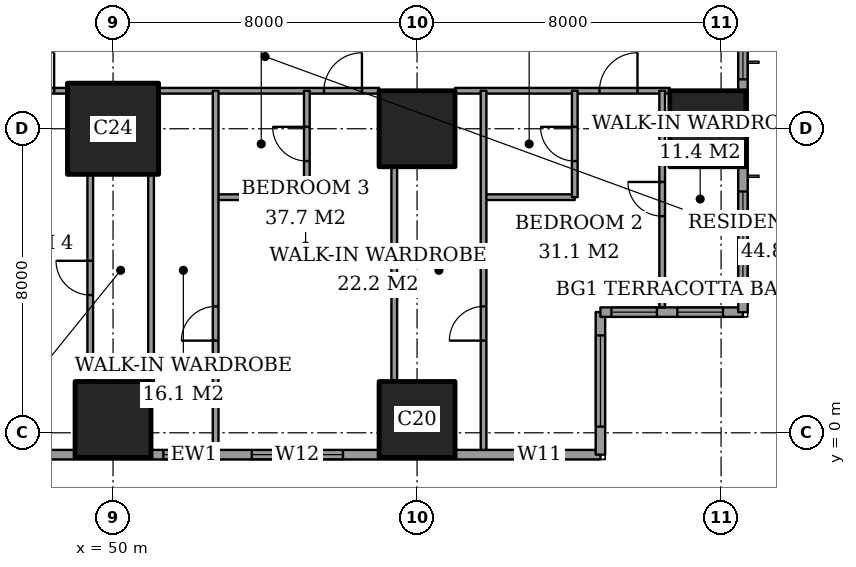
"""IFC4 building model, lengths in metres.
Left out: names, types, materials, properties, quantities, classifications, styles, units other than length and angle.
Written with IfcOpenShell. Run it as: python <this file> out.ifc"""

import sys

from ifc_helpers import new_model, si_unit, direction, frame, frame_2d, origin, origin_2d, place, context, subcontext, project, spatial, rectangle, extrude, element, fill, save


model = new_model("IFC4")
c1 = context("Model", 3, precision=1e-05, world=origin(), true_north=direction((0.0, 1.0)))
c2 = subcontext(c1, "Body", "Model", "MODEL_VIEW")
j1 = project(units=[si_unit("LENGTHUNIT", "METRE"), si_unit("PLANEANGLEUNIT", "RADIAN")], contexts=[c1])
p1 = place(None, origin())
s1 = spatial("IfcSite", under=j1, at=p1, CompositionType="ELEMENT")
p2 = place(p1, origin())
s2 = spatial("IfcBuilding", under=s1, at=p2, CompositionType="ELEMENT")
p3 = place(p2, frame((0.0, 0.0, 128.6)))
s3 = spatial("IfcBuildingStorey", under=s2, at=p3, CompositionType="ELEMENT", Elevation=128.6)
p4 = place(p3, frame((50.0, 0.35, 0.0), z_axis=(0.0, 0.0, 1.0), x_axis=(1.0, 0.0, 0.0)))
e1 = element("IfcColumn", 1, at=p4, inside=s3, PredefinedType="COLUMN", context=c2, shape_type="SweptSolid", body=[
    extrude(rectangle(XDim=2.0, YDim=2.0, at=origin_2d()), origin(), (0.0, 0.0, 1.0), 3.6),
])
p5 = place(p3, frame((50.0, 8.0, 0.0), z_axis=(0.0, 0.0, 1.0), x_axis=(1.0, 0.0, 0.0)))
e2 = element("IfcColumn", 2, at=p5, inside=s3, PredefinedType="COLUMN", context=c2, shape_type="SweptSolid", body=[
    extrude(rectangle(XDim=2.4, YDim=2.4, at=origin_2d()), origin(), (0.0, 0.0, 1.0), 3.6),
])
for number, where, z_axis, x_axis in (
    (3, (58.0, 0.35, 0.0), (0.0, 0.0, 1.0), (1.0, 0.0, 0.0)),
    (4, (58.0, 8.0, 0.0), (0.0, 0.0, 1.0), (1.0, 0.0, 0.0)),
    (5, (65.65, 8.0, 0.0), (0.0, 0.0, 1.0), (1.0, 0.0, 0.0)),
):
    element("IfcColumn", number, at=place(p3, frame(where, z_axis=z_axis, x_axis=x_axis)), inside=s3, PredefinedType="COLUMN", context=c2, shape_type="SweptSolid", body=[
        extrude(rectangle(XDim=2.0, YDim=2.0, at=origin_2d()), origin(), (0.0, 0.0, 1.0), 3.6),
    ])
p6 = place(p3, frame((41.425, -0.575, 0.0), z_axis=(0.0, 0.0, 1.0), x_axis=(1.0, 0.0, 0.0)))
e6 = element("IfcWall", 6, at=p6, inside=s3, PredefinedType="SOLIDWALL", context=c2, shape_type="SweptSolid", body=[
    extrude(rectangle(XDim=21.4, YDim=0.25, at=frame_2d((10.7, 0.0))), origin(), (0.0, 0.0, 1.0), 3.6),
])
p7 = place(p6, frame((2.3, 0.0, 0.4)))
e7 = element("IfcOpeningElement", 7, at=p7, cuts=e6, PredefinedType="OPENING", context=c2, shape_type="SweptSolid", body=[
    extrude(rectangle(XDim=1.2, YDim=2.2, at=frame_2d((0.6, 1.1))), frame((0.0, 0.135, 0.0), z_axis=(0.0, -1.0, 0.0), x_axis=(1.0, 0.0, 0.0)), (0.0, 0.0, 1.0), 0.27),
])
p8 = place(p6, frame((4.525, 0.0, 0.4)))
e8 = element("IfcOpeningElement", 8, at=p8, cuts=e6, PredefinedType="OPENING", context=c2, shape_type="SweptSolid", body=[
    extrude(rectangle(XDim=2.4, YDim=2.2, at=frame_2d((1.2, 1.1))), frame((0.0, 0.135, 0.0), z_axis=(0.0, -1.0, 0.0), x_axis=(1.0, 0.0, 0.0)), (0.0, 0.0, 1.0), 0.27),
])
p9 = place(p6, frame((9.9, 0.0, 0.4)))
e9 = element("IfcOpeningElement", 9, at=p9, cuts=e6, PredefinedType="OPENING", context=c2, shape_type="SweptSolid", body=[
    extrude(rectangle(XDim=1.2, YDim=2.2, at=frame_2d((0.6, 1.1))), frame((0.0, 0.135, 0.0), z_axis=(0.0, -1.0, 0.0), x_axis=(1.0, 0.0, 0.0)), (0.0, 0.0, 1.0), 0.27),
])
p10 = place(p6, frame((12.225, 0.0, 0.4)))
e10 = element("IfcOpeningElement", 10, at=p10, cuts=e6, PredefinedType="OPENING", context=c2, shape_type="SweptSolid", body=[
    extrude(rectangle(XDim=2.4, YDim=2.2, at=frame_2d((1.2, 1.1))), frame((0.0, 0.135, 0.0), z_axis=(0.0, -1.0, 0.0), x_axis=(1.0, 0.0, 0.0)), (0.0, 0.0, 1.0), 0.27),
])
p11 = place(p6, frame((19.2, 0.0, 0.4)))
e11 = element("IfcOpeningElement", 11, at=p11, cuts=e6, PredefinedType="OPENING", context=c2, shape_type="SweptSolid", body=[
    extrude(rectangle(XDim=1.2, YDim=2.2, at=frame_2d((0.6, 1.1))), frame((0.0, 0.135, 0.0), z_axis=(0.0, -1.0, 0.0), x_axis=(1.0, 0.0, 0.0)), (0.0, 0.0, 1.0), 0.27),
])
p12 = place(p3, frame((62.825, -0.575, 0.0), z_axis=(0.0, 0.0, 1.0), x_axis=(0.0, 1.0, 0.0)))
e12 = element("IfcWall", 12, at=p12, inside=s3, PredefinedType="SOLIDWALL", context=c2, shape_type="SweptSolid", body=[
    extrude(rectangle(XDim=3.75, YDim=0.25, at=frame_2d((1.875, 0.0))), origin(), (0.0, 0.0, 1.0), 3.6),
])
p13 = place(p12, frame((0.738, 0.0, 0.4)))
e13 = element("IfcOpeningElement", 13, at=p13, cuts=e12, PredefinedType="OPENING", context=c2, shape_type="SweptSolid", body=[
    extrude(rectangle(XDim=2.4, YDim=2.2, at=frame_2d((1.2, 1.1))), frame((0.0, 0.135, 0.0), z_axis=(0.0, -1.0, 0.0), x_axis=(1.0, 0.0, 0.0)), (0.0, 0.0, 1.0), 0.27),
])
p14 = place(p3, frame((62.825, 3.175, 0.0), z_axis=(0.0, 0.0, 1.0), x_axis=(1.0, 0.0, 0.0)))
e14 = element("IfcWall", 14, at=p14, inside=s3, PredefinedType="SOLIDWALL", context=c2, shape_type="SweptSolid", body=[
    extrude(rectangle(XDim=3.75, YDim=0.25, at=frame_2d((1.875, 0.0))), origin(), (0.0, 0.0, 1.0), 3.6),
])
p15 = place(p14, frame((0.288, 0.0, 0.4)))
e15 = element("IfcOpeningElement", 15, at=p15, cuts=e14, PredefinedType="OPENING", context=c2, shape_type="SweptSolid", body=[
    extrude(rectangle(XDim=1.2, YDim=2.2, at=frame_2d((0.6, 1.1))), frame((0.0, 0.135, 0.0), z_axis=(0.0, -1.0, 0.0), x_axis=(1.0, 0.0, 0.0)), (0.0, 0.0, 1.0), 0.27),
])
p16 = place(p14, frame((2.025, 0.0, 0.4)))
e16 = element("IfcOpeningElement", 16, at=p16, cuts=e14, PredefinedType="OPENING", context=c2, shape_type="SweptSolid", body=[
    extrude(rectangle(XDim=1.2, YDim=2.2, at=frame_2d((0.6, 1.1))), frame((0.0, 0.135, 0.0), z_axis=(0.0, -1.0, 0.0), x_axis=(1.0, 0.0, 0.0)), (0.0, 0.0, 1.0), 0.27),
])
p17 = place(p3, frame((66.575, 3.175, 0.0), z_axis=(0.0, 0.0, 1.0), x_axis=(0.0, 1.0, 0.0)))
e17 = element("IfcWall", 17, at=p17, inside=s3, PredefinedType="SOLIDWALL", context=c2, shape_type="SweptSolid", body=[
    extrude(rectangle(XDim=41.65, YDim=0.25, at=frame_2d((20.825, 0.0))), origin(), (0.0, 0.0, 1.0), 3.6),
])
p18 = place(p17, frame((0.775, 0.0, 0.4)))
e18 = element("IfcOpeningElement", 18, at=p18, cuts=e17, PredefinedType="OPENING", context=c2, shape_type="SweptSolid", body=[
    extrude(rectangle(XDim=2.4, YDim=2.2, at=frame_2d((1.2, 1.1))), frame((0.0, 0.135, 0.0), z_axis=(0.0, -1.0, 0.0), x_axis=(1.0, 0.0, 0.0)), (0.0, 0.0, 1.0), 0.27),
])
p19 = place(p17, frame((6.125, 0.0, 0.4)))
e19 = element("IfcOpeningElement", 19, at=p19, cuts=e17, PredefinedType="OPENING", context=c2, shape_type="SweptSolid", body=[
    extrude(rectangle(XDim=1.2, YDim=2.2, at=frame_2d((0.6, 1.1))), frame((0.0, 0.135, 0.0), z_axis=(0.0, -1.0, 0.0), x_axis=(1.0, 0.0, 0.0)), (0.0, 0.0, 1.0), 0.27),
])
p20 = place(p17, frame((8.375, 0.0, 0.4)))
e20 = element("IfcOpeningElement", 20, at=p20, cuts=e17, PredefinedType="OPENING", context=c2, shape_type="SweptSolid", body=[
    extrude(rectangle(XDim=2.4, YDim=2.2, at=frame_2d((1.2, 1.1))), frame((0.0, 0.135, 0.0), z_axis=(0.0, -1.0, 0.0), x_axis=(1.0, 0.0, 0.0)), (0.0, 0.0, 1.0), 0.27),
])
p21 = place(p17, frame((15.775, 0.0, 0.4)))
e21 = element("IfcOpeningElement", 21, at=p21, cuts=e17, PredefinedType="OPENING", context=c2, shape_type="SweptSolid", body=[
    extrude(rectangle(XDim=2.4, YDim=2.2, at=frame_2d((1.2, 1.1))), frame((0.0, 0.135, 0.0), z_axis=(0.0, -1.0, 0.0), x_axis=(1.0, 0.0, 0.0)), (0.0, 0.0, 1.0), 0.27),
])
p22 = place(p17, frame((23.475, 0.0, 0.4)))
e22 = element("IfcOpeningElement", 22, at=p22, cuts=e17, PredefinedType="OPENING", context=c2, shape_type="SweptSolid", body=[
    extrude(rectangle(XDim=2.4, YDim=2.2, at=frame_2d((1.2, 1.1))), frame((0.0, 0.135, 0.0), z_axis=(0.0, -1.0, 0.0), x_axis=(1.0, 0.0, 0.0)), (0.0, 0.0, 1.0), 0.27),
])
p23 = place(p17, frame((30.975, 0.0, 0.4)))
e23 = element("IfcOpeningElement", 23, at=p23, cuts=e17, PredefinedType="OPENING", context=c2, shape_type="SweptSolid", body=[
    extrude(rectangle(XDim=2.4, YDim=2.2, at=frame_2d((1.2, 1.1))), frame((0.0, 0.135, 0.0), z_axis=(0.0, -1.0, 0.0), x_axis=(1.0, 0.0, 0.0)), (0.0, 0.0, 1.0), 0.27),
])
p24 = place(p17, frame((34.5, 0.0, 0.4)))
e24 = element("IfcOpeningElement", 24, at=p24, cuts=e17, PredefinedType="OPENING", context=c2, shape_type="SweptSolid", body=[
    extrude(rectangle(XDim=1.2, YDim=2.2, at=frame_2d((0.6, 1.1))), frame((0.0, 0.135, 0.0), z_axis=(0.0, -1.0, 0.0), x_axis=(1.0, 0.0, 0.0)), (0.0, 0.0, 1.0), 0.27),
])
p25 = place(p17, frame((38.475, 0.0, 0.4)))
e25 = element("IfcOpeningElement", 25, at=p25, cuts=e17, PredefinedType="OPENING", context=c2, shape_type="SweptSolid", body=[
    extrude(rectangle(XDim=2.4, YDim=2.2, at=frame_2d((1.2, 1.1))), frame((0.0, 0.135, 0.0), z_axis=(0.0, -1.0, 0.0), x_axis=(1.0, 0.0, 0.0)), (0.0, 0.0, 1.0), 0.27),
])
p26 = place(p3, frame((52.7, 6.2, 0.0), z_axis=(0.0, 0.0, 1.0), x_axis=(1.0, 0.0, 0.0)))
e26 = element("IfcWall", 26, at=p26, inside=s3, PredefinedType="PARTITIONING", context=c2, shape_type="SweptSolid", body=[
    extrude(rectangle(XDim=2.4, YDim=0.15, at=frame_2d((1.2, 0.0))), origin(), (0.0, 0.0, 1.0), 3.35),
])
p27 = place(p3, frame((59.75, 6.2, 0.0), z_axis=(0.0, 0.0, 1.0), x_axis=(1.0, 0.0, 0.0)))
e27 = element("IfcWall", 27, at=p27, inside=s3, PredefinedType="PARTITIONING", context=c2, shape_type="SweptSolid", body=[
    extrude(rectangle(XDim=2.4, YDim=0.15, at=frame_2d((1.2, 0.0))), origin(), (0.0, 0.0, 1.0), 3.35),
])
p28 = place(p3, frame((43.35, 9.0, 0.0), z_axis=(0.0, 0.0, 1.0), x_axis=(1.0, 0.0, 0.0)))
e28 = element("IfcWall", 28, at=p28, inside=s3, PredefinedType="PARTITIONING", context=c2, shape_type="SweptSolid", body=[
    extrude(rectangle(XDim=5.45, YDim=0.15, at=frame_2d((2.725, 0.0))), origin(), (0.0, 0.0, 1.0), 3.35),
])
p29 = place(p28, frame((4.1, 0.0, 0.0)))
e29 = element("IfcOpeningElement", 29, at=p29, cuts=e28, PredefinedType="OPENING", context=c2, shape_type="SweptSolid", body=[
    extrude(rectangle(XDim=1.0, YDim=2.1, at=frame_2d((0.5, 1.05))), frame((0.0, 0.085, 0.0), z_axis=(0.0, -1.0, 0.0), x_axis=(1.0, 0.0, 0.0)), (0.0, 0.0, 1.0), 0.17),
])
p30 = place(p28, frame((0.475, 0.0, 0.0)))
e30 = element("IfcOpeningElement", 30, at=p30, cuts=e28, PredefinedType="OPENING", context=c2, shape_type="SweptSolid", body=[
    extrude(rectangle(XDim=1.0, YDim=2.1, at=frame_2d((0.5, 1.05))), frame((0.0, 0.085, 0.0), z_axis=(0.0, -1.0, 0.0), x_axis=(1.0, 0.0, 0.0)), (0.0, 0.0, 1.0), 0.17),
])
p31 = place(p3, frame((51.2, 9.0, 0.0), z_axis=(0.0, 0.0, 1.0), x_axis=(1.0, 0.0, 0.0)))
e31 = element("IfcWall", 31, at=p31, inside=s3, PredefinedType="PARTITIONING", context=c2, shape_type="SweptSolid", body=[
    extrude(rectangle(XDim=5.8, YDim=0.15, at=frame_2d((2.9, 0.0))), origin(), (0.0, 0.0, 1.0), 3.35),
])
p32 = place(p31, frame((4.35, 0.0, 0.0)))
e32 = element("IfcOpeningElement", 32, at=p32, cuts=e31, PredefinedType="OPENING", context=c2, shape_type="SweptSolid", body=[
    extrude(rectangle(XDim=1.0, YDim=2.1, at=frame_2d((0.5, 1.05))), frame((0.0, 0.085, 0.0), z_axis=(0.0, -1.0, 0.0), x_axis=(1.0, 0.0, 0.0)), (0.0, 0.0, 1.0), 0.17),
])
p33 = place(p3, frame((59.0, 9.0, 0.0), z_axis=(0.0, 0.0, 1.0), x_axis=(1.0, 0.0, 0.0)))
e33 = element("IfcWall", 33, at=p33, inside=s3, PredefinedType="PARTITIONING", context=c2, shape_type="SweptSolid", body=[
    extrude(rectangle(XDim=5.65, YDim=0.15, at=frame_2d((2.825, 0.0))), origin(), (0.0, 0.0, 1.0), 3.35),
])
p34 = place(p33, frame((3.8, 0.0, 0.0)))
e34 = element("IfcOpeningElement", 34, at=p34, cuts=e33, PredefinedType="OPENING", context=c2, shape_type="SweptSolid", body=[
    extrude(rectangle(XDim=1.0, YDim=2.1, at=frame_2d((0.5, 1.05))), frame((0.0, 0.085, 0.0), z_axis=(0.0, -1.0, 0.0), x_axis=(1.0, 0.0, 0.0)), (0.0, 0.0, 1.0), 0.17),
])
p35 = place(p3, frame((49.4, 1.35, 0.0), z_axis=(0.0, 0.0, 1.0), x_axis=(0.0, 1.0, 0.0)))
e35 = element("IfcWall", 35, at=p35, inside=s3, PredefinedType="PARTITIONING", context=c2, shape_type="SweptSolid", body=[
    extrude(rectangle(XDim=5.45, YDim=0.15, at=frame_2d((2.725, 0.0))), origin(), (0.0, 0.0, 1.0), 3.35),
])
p36 = place(p35, frame((2.275, 0.0, 0.0)))
e36 = element("IfcOpeningElement", 36, at=p36, cuts=e35, PredefinedType="OPENING", context=c2, shape_type="SweptSolid", body=[
    extrude(rectangle(XDim=0.9, YDim=2.1, at=frame_2d((0.45, 1.05))), frame((0.0, 0.085, 0.0), z_axis=(0.0, -1.0, 0.0), x_axis=(1.0, 0.0, 0.0)), (0.0, 0.0, 1.0), 0.17),
])
p37 = place(p3, frame((51.0, 1.35, 0.0), z_axis=(0.0, 0.0, 1.0), x_axis=(0.0, 1.0, 0.0)))
e37 = element("IfcWall", 37, at=p37, inside=s3, PredefinedType="PARTITIONING", context=c2, shape_type="SweptSolid", body=[
    extrude(rectangle(XDim=5.45, YDim=0.15, at=frame_2d((2.725, 0.0))), origin(), (0.0, 0.0, 1.0), 3.35),
])
p38 = place(p3, frame((52.7, -0.45, 0.0), z_axis=(0.0, 0.0, 1.0), x_axis=(0.0, 1.0, 0.0)))
e38 = element("IfcWall", 38, at=p38, inside=s3, PredefinedType="PARTITIONING", context=c2, shape_type="SweptSolid", body=[
    extrude(rectangle(XDim=9.45, YDim=0.15, at=frame_2d((4.725, 0.0))), origin(), (0.0, 0.0, 1.0), 3.35),
])
p39 = place(p38, frame((2.875, 0.0, 0.0)))
e39 = element("IfcOpeningElement", 39, at=p39, cuts=e38, PredefinedType="OPENING", context=c2, shape_type="SweptSolid", body=[
    extrude(rectangle(XDim=0.9, YDim=2.1, at=frame_2d((0.45, 1.05))), frame((0.0, 0.085, 0.0), z_axis=(0.0, -1.0, 0.0), x_axis=(1.0, 0.0, 0.0)), (0.0, 0.0, 1.0), 0.17),
])
p40 = place(p3, frame((55.1, 6.2, 0.0), z_axis=(0.0, 0.0, 1.0), x_axis=(0.0, 1.0, 0.0)))
e40 = element("IfcWall", 40, at=p40, inside=s3, PredefinedType="PARTITIONING", context=c2, shape_type="SweptSolid", body=[
    extrude(rectangle(XDim=2.8, YDim=0.15, at=frame_2d((1.4, 0.0))), origin(), (0.0, 0.0, 1.0), 3.35),
])
p41 = place(p40, frame((0.95, 0.0, 0.0)))
e41 = element("IfcOpeningElement", 41, at=p41, cuts=e40, PredefinedType="OPENING", context=c2, shape_type="SweptSolid", body=[
    extrude(rectangle(XDim=0.9, YDim=2.1, at=frame_2d((0.45, 1.05))), frame((0.0, 0.085, 0.0), z_axis=(0.0, -1.0, 0.0), x_axis=(1.0, 0.0, 0.0)), (0.0, 0.0, 1.0), 0.17),
])
p42 = place(p3, frame((57.4, 1.35, 0.0), z_axis=(0.0, 0.0, 1.0), x_axis=(0.0, 1.0, 0.0)))
e42 = element("IfcWall", 42, at=p42, inside=s3, PredefinedType="PARTITIONING", context=c2, shape_type="SweptSolid", body=[
    extrude(rectangle(XDim=5.65, YDim=0.15, at=frame_2d((2.825, 0.0))), origin(), (0.0, 0.0, 1.0), 3.35),
])
p43 = place(p3, frame((59.75, -0.45, 0.0), z_axis=(0.0, 0.0, 1.0), x_axis=(0.0, 1.0, 0.0)))
e43 = element("IfcWall", 43, at=p43, inside=s3, PredefinedType="PARTITIONING", context=c2, shape_type="SweptSolid", body=[
    extrude(rectangle(XDim=9.45, YDim=0.15, at=frame_2d((4.725, 0.0))), origin(), (0.0, 0.0, 1.0), 3.35),
])
p44 = place(p43, frame((2.875, 0.0, 0.0)))
e44 = element("IfcOpeningElement", 44, at=p44, cuts=e43, PredefinedType="OPENING", context=c2, shape_type="SweptSolid", body=[
    extrude(rectangle(XDim=0.9, YDim=2.1, at=frame_2d((0.45, 1.05))), frame((0.0, 0.085, 0.0), z_axis=(0.0, -1.0, 0.0), x_axis=(1.0, 0.0, 0.0)), (0.0, 0.0, 1.0), 0.17),
])
p45 = place(p3, frame((62.15, 6.2, 0.0), z_axis=(0.0, 0.0, 1.0), x_axis=(0.0, 1.0, 0.0)))
e45 = element("IfcWall", 45, at=p45, inside=s3, PredefinedType="PARTITIONING", context=c2, shape_type="SweptSolid", body=[
    extrude(rectangle(XDim=2.8, YDim=0.15, at=frame_2d((1.4, 0.0))), origin(), (0.0, 0.0, 1.0), 3.35),
])
p46 = place(p45, frame((0.95, 0.0, 0.0)))
e46 = element("IfcOpeningElement", 46, at=p46, cuts=e45, PredefinedType="OPENING", context=c2, shape_type="SweptSolid", body=[
    extrude(rectangle(XDim=0.9, YDim=2.1, at=frame_2d((0.45, 1.05))), frame((0.0, 0.085, 0.0), z_axis=(0.0, -1.0, 0.0), x_axis=(1.0, 0.0, 0.0)), (0.0, 0.0, 1.0), 0.17),
])
p47 = place(p3, frame((64.45, 3.3, 0.0), z_axis=(0.0, 0.0, 1.0), x_axis=(0.0, 1.0, 0.0)))
e47 = element("IfcWall", 47, at=p47, inside=s3, PredefinedType="PARTITIONING", context=c2, shape_type="SweptSolid", body=[
    extrude(rectangle(XDim=5.7, YDim=0.15, at=frame_2d((2.85, 0.0))), origin(), (0.0, 0.0, 1.0), 3.35),
])
p48 = place(p47, frame((2.4, 0.0, 0.0)))
e48 = element("IfcOpeningElement", 48, at=p48, cuts=e47, PredefinedType="OPENING", context=c2, shape_type="SweptSolid", body=[
    extrude(rectangle(XDim=0.9, YDim=2.1, at=frame_2d((0.45, 1.05))), frame((0.0, 0.085, 0.0), z_axis=(0.0, -1.0, 0.0), x_axis=(1.0, 0.0, 0.0)), (0.0, 0.0, 1.0), 0.17),
])
p49 = place(p9, origin())
e49 = element("IfcWindow", 49, at=p49, inside=s3, PartitioningType="SINGLE_PANEL", PredefinedType="WINDOW", context=c2, shape_type="SweptSolid", body=[
    extrude(rectangle(XDim=1.2, YDim=2.2, at=frame_2d((0.6, 1.1))), frame((0.0, 0.03, 0.0), z_axis=(0.0, -1.0, 0.0), x_axis=(1.0, 0.0, 0.0)), (0.0, 0.0, 1.0), 0.06),
])
fill(e9, e49)
p50 = place(p10, origin())
e50 = element("IfcWindow", 50, at=p50, inside=s3, PartitioningType="SINGLE_PANEL", PredefinedType="WINDOW", context=c2, shape_type="SweptSolid", body=[
    extrude(rectangle(XDim=2.4, YDim=2.2, at=frame_2d((1.2, 1.1))), frame((0.0, 0.03, 0.0), z_axis=(0.0, -1.0, 0.0), x_axis=(1.0, 0.0, 0.0)), (0.0, 0.0, 1.0), 0.06),
])
fill(e10, e50)
p51 = place(p11, origin())
e51 = element("IfcWindow", 51, at=p51, inside=s3, PartitioningType="SINGLE_PANEL", PredefinedType="WINDOW", context=c2, shape_type="SweptSolid", body=[
    extrude(rectangle(XDim=1.2, YDim=2.2, at=frame_2d((0.6, 1.1))), frame((0.0, 0.03, 0.0), z_axis=(0.0, -1.0, 0.0), x_axis=(1.0, 0.0, 0.0)), (0.0, 0.0, 1.0), 0.06),
])
fill(e11, e51)
p52 = place(p13, origin())
e52 = element("IfcWindow", 52, at=p52, inside=s3, PartitioningType="SINGLE_PANEL", PredefinedType="WINDOW", context=c2, shape_type="SweptSolid", body=[
    extrude(rectangle(XDim=2.4, YDim=2.2, at=frame_2d((1.2, 1.1))), frame((0.0, 0.03, 0.0), z_axis=(0.0, -1.0, 0.0), x_axis=(1.0, 0.0, 0.0)), (0.0, 0.0, 1.0), 0.06),
])
fill(e13, e52)
p53 = place(p15, origin())
e53 = element("IfcWindow", 53, at=p53, inside=s3, PartitioningType="SINGLE_PANEL", PredefinedType="WINDOW", context=c2, shape_type="SweptSolid", body=[
    extrude(rectangle(XDim=1.2, YDim=2.2, at=frame_2d((0.6, 1.1))), frame((0.0, 0.03, 0.0), z_axis=(0.0, -1.0, 0.0), x_axis=(1.0, 0.0, 0.0)), (0.0, 0.0, 1.0), 0.06),
])
fill(e15, e53)
p54 = place(p16, origin())
e54 = element("IfcWindow", 54, at=p54, inside=s3, PartitioningType="SINGLE_PANEL", PredefinedType="WINDOW", context=c2, shape_type="SweptSolid", body=[
    extrude(rectangle(XDim=1.2, YDim=2.2, at=frame_2d((0.6, 1.1))), frame((0.0, 0.03, 0.0), z_axis=(0.0, -1.0, 0.0), x_axis=(1.0, 0.0, 0.0)), (0.0, 0.0, 1.0), 0.06),
])
fill(e16, e54)
p55 = place(p18, origin())
e55 = element("IfcWindow", 55, at=p55, inside=s3, PartitioningType="SINGLE_PANEL", PredefinedType="WINDOW", context=c2, shape_type="SweptSolid", body=[
    extrude(rectangle(XDim=2.4, YDim=2.2, at=frame_2d((1.2, 1.1))), frame((0.0, 0.03, 0.0), z_axis=(0.0, -1.0, 0.0), x_axis=(1.0, 0.0, 0.0)), (0.0, 0.0, 1.0), 0.06),
])
fill(e18, e55)
p56 = place(p19, origin())
e56 = element("IfcWindow", 56, at=p56, inside=s3, PartitioningType="SINGLE_PANEL", PredefinedType="WINDOW", context=c2, shape_type="SweptSolid", body=[
    extrude(rectangle(XDim=1.2, YDim=2.2, at=frame_2d((0.6, 1.1))), frame((0.0, 0.03, 0.0), z_axis=(0.0, -1.0, 0.0), x_axis=(1.0, 0.0, 0.0)), (0.0, 0.0, 1.0), 0.06),
])
fill(e19, e56)
p57 = place(p48, origin())
e57 = element("IfcDoor", 57, at=p57, inside=s3, OperationType="SINGLE_SWING_LEFT", PredefinedType="DOOR", context=c2, shape_type="SweptSolid", body=[
    extrude(rectangle(XDim=0.9, YDim=2.1, at=frame_2d((0.45, 1.05))), frame((0.0, 0.025, 0.0), z_axis=(0.0, -1.0, 0.0), x_axis=(1.0, 0.0, 0.0)), (0.0, 0.0, 1.0), 0.05),
])
fill(e48, e57)
p58 = place(p46, origin())
e58 = element("IfcDoor", 58, at=p58, inside=s3, OperationType="SINGLE_SWING_LEFT", PredefinedType="DOOR", context=c2, shape_type="SweptSolid", body=[
    extrude(rectangle(XDim=0.9, YDim=2.1, at=frame_2d((0.45, 1.05))), frame((0.0, 0.025, 0.0), z_axis=(0.0, -1.0, 0.0), x_axis=(1.0, 0.0, 0.0)), (0.0, 0.0, 1.0), 0.05),
])
fill(e46, e58)
p59 = place(p34, origin())
e59 = element("IfcDoor", 59, at=p59, inside=s3, OperationType="SINGLE_SWING_LEFT", PredefinedType="DOOR", context=c2, shape_type="SweptSolid", body=[
    extrude(rectangle(XDim=1.0, YDim=2.1, at=frame_2d((0.5, 1.05))), frame((0.0, 0.025, 0.0), z_axis=(0.0, -1.0, 0.0), x_axis=(1.0, 0.0, 0.0)), (0.0, 0.0, 1.0), 0.05),
])
fill(e34, e59)
p60 = place(p44, origin())
e60 = element("IfcDoor", 60, at=p60, inside=s3, OperationType="SINGLE_SWING_RIGHT", PredefinedType="DOOR", context=c2, shape_type="SweptSolid", body=[
    extrude(rectangle(XDim=0.9, YDim=2.1, at=frame_2d((0.45, 1.05))), frame((0.0, 0.025, 0.0), z_axis=(0.0, -1.0, 0.0), x_axis=(1.0, 0.0, 0.0)), (0.0, 0.0, 1.0), 0.05),
])
fill(e44, e60)
p61 = place(p41, origin())
e61 = element("IfcDoor", 61, at=p61, inside=s3, OperationType="SINGLE_SWING_LEFT", PredefinedType="DOOR", context=c2, shape_type="SweptSolid", body=[
    extrude(rectangle(XDim=0.9, YDim=2.1, at=frame_2d((0.45, 1.05))), frame((0.0, 0.025, 0.0), z_axis=(0.0, -1.0, 0.0), x_axis=(1.0, 0.0, 0.0)), (0.0, 0.0, 1.0), 0.05),
])
fill(e41, e61)
p62 = place(p32, origin())
e62 = element("IfcDoor", 62, at=p62, inside=s3, OperationType="SINGLE_SWING_LEFT", PredefinedType="DOOR", context=c2, shape_type="SweptSolid", body=[
    extrude(rectangle(XDim=1.0, YDim=2.1, at=frame_2d((0.5, 1.05))), frame((0.0, 0.025, 0.0), z_axis=(0.0, -1.0, 0.0), x_axis=(1.0, 0.0, 0.0)), (0.0, 0.0, 1.0), 0.05),
])
fill(e32, e62)
p63 = place(p39, origin())
e63 = element("IfcDoor", 63, at=p63, inside=s3, OperationType="SINGLE_SWING_RIGHT", PredefinedType="DOOR", context=c2, shape_type="SweptSolid", body=[
    extrude(rectangle(XDim=0.9, YDim=2.1, at=frame_2d((0.45, 1.05))), frame((0.0, 0.025, 0.0), z_axis=(0.0, -1.0, 0.0), x_axis=(1.0, 0.0, 0.0)), (0.0, 0.0, 1.0), 0.05),
])
fill(e39, e63)
p64 = place(p36, origin())
e64 = element("IfcDoor", 64, at=p64, inside=s3, OperationType="SINGLE_SWING_LEFT", PredefinedType="DOOR", context=c2, shape_type="SweptSolid", body=[
    extrude(rectangle(XDim=0.9, YDim=2.1, at=frame_2d((0.45, 1.05))), frame((0.0, 0.025, 0.0), z_axis=(0.0, -1.0, 0.0), x_axis=(1.0, 0.0, 0.0)), (0.0, 0.0, 1.0), 0.05),
])
fill(e36, e64)
p65 = place(p29, origin())
e65 = element("IfcDoor", 65, at=p65, inside=s3, OperationType="SINGLE_SWING_LEFT", PredefinedType="DOOR", context=c2, shape_type="SweptSolid", body=[
    extrude(rectangle(XDim=1.0, YDim=2.1, at=frame_2d((0.5, 1.05))), frame((0.0, 0.025, 0.0), z_axis=(0.0, -1.0, 0.0), x_axis=(1.0, 0.0, 0.0)), (0.0, 0.0, 1.0), 0.05),
])
fill(e29, e65)
save(model, sys.argv[1])
